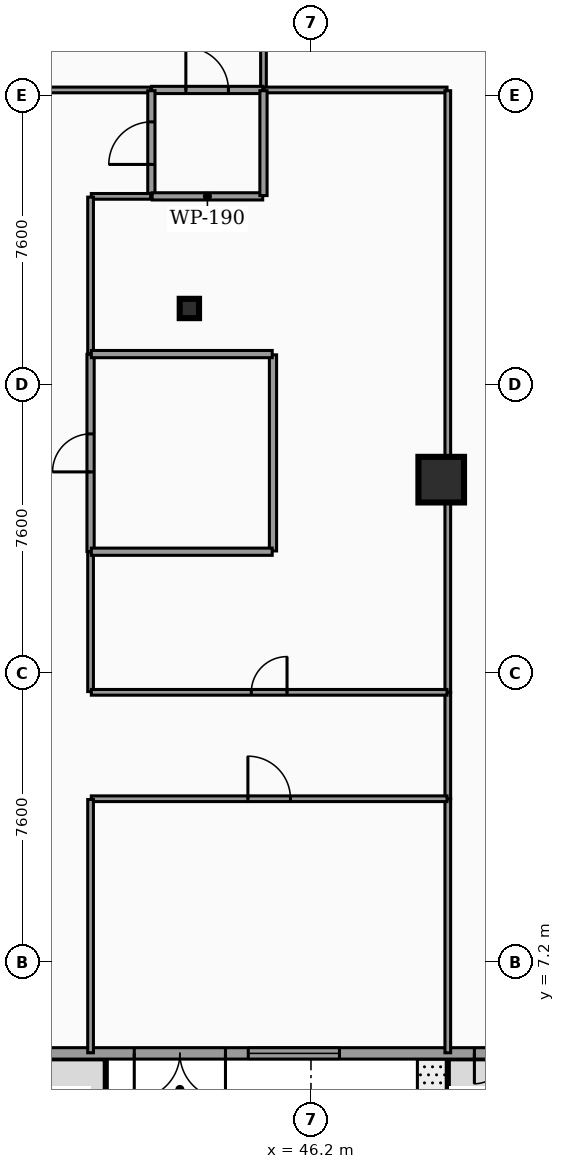
"""IFC4 building model, lengths in metres.
Left out: names, types, materials, properties, quantities, classifications, styles, units other than length and angle.
Written with IfcOpenShell. Run it as: python <this file> out.ifc"""

import sys

from ifc_helpers import new_model, si_unit, direction, frame, frame_2d, origin, origin_2d, place, context, subcontext, project, spatial, rectangle, hollow_rectangle, hollow_circle, extrude, element, fill, save


model = new_model("IFC4")
c1 = context("Model", 3, precision=1e-05, world=origin(), true_north=direction((0.0, 1.0)))
c2 = subcontext(c1, "Body", "Model", "MODEL_VIEW")
j1 = project(units=[si_unit("LENGTHUNIT", "METRE"), si_unit("PLANEANGLEUNIT", "RADIAN")], contexts=[c1])
p1 = place(None, origin())
s1 = spatial("IfcSite", under=j1, at=p1, CompositionType="ELEMENT")
p2 = place(p1, origin())
s2 = spatial("IfcBuilding", under=s1, at=p2, CompositionType="ELEMENT")
p3 = place(p2, origin())
s3 = spatial("IfcBuildingStorey", under=s2, at=p3, CompositionType="ELEMENT", Elevation=0.0)
p4 = place(p3, frame((49.627, 19.896, 0.0), z_axis=(0.0, 0.0, 1.0), x_axis=(1.0, 0.0, 0.0)))
e1 = element("IfcColumn", 1, at=p4, inside=s3, PredefinedType="COLUMN", context=c2, shape_type="SweptSolid", body=[
    extrude(hollow_rectangle(XDim=1.2, YDim=1.2, WallThickness=0.06, at=origin_2d()), origin(), (0.0, 0.0, 1.0), 4.82),
])
p5 = place(p3, frame((43.0, 24.4, 0.0), z_axis=(0.0, 0.0, 1.0), x_axis=(1.0, 0.0, 0.0)))
e2 = element("IfcColumn", 2, at=p5, inside=s3, PredefinedType="COLUMN", context=c2, shape_type="SweptSolid", body=[
    extrude(hollow_circle(Radius=0.254, WallThickness=0.02, at=origin_2d()), origin(), (0.0, 0.0, 1.0), 4.82),
])
p6 = place(p3, frame((75.1, 4.8, 0.0), z_axis=(0.0, 0.0, 1.0), x_axis=(-1.0, 0.0, 0.0)))
e3 = element("IfcWall", 3, at=p6, inside=s3, PredefinedType="STANDARD", context=c2, shape_type="SweptSolid", body=[
    extrude(rectangle(XDim=73.4, YDim=0.3, at=frame_2d((36.7, 0.0))), origin(), (0.0, 0.0, 1.0), 4.205),
])
p7 = place(p6, frame((65.3, 0.0, 0.0)))
e4 = element("IfcOpeningElement", 4, at=p7, cuts=e3, PredefinedType="OPENING", context=c2, shape_type="SweptSolid", body=[
    extrude(rectangle(XDim=4.4, YDim=3.5, at=frame_2d((2.2, 1.75))), frame((0.0, 0.16, 0.0), z_axis=(0.0, -1.0, 0.0), x_axis=(1.0, 0.0, 0.0)), (0.0, 0.0, 1.0), 0.32),
])
p8 = place(p6, frame((31.15, 0.0, 0.0)))
e5 = element("IfcOpeningElement", 5, at=p8, cuts=e3, PredefinedType="OPENING", context=c2, shape_type="SweptSolid", body=[
    extrude(rectangle(XDim=2.4, YDim=2.6, at=frame_2d((1.2, 1.3))), frame((0.0, 0.16, 0.0), z_axis=(0.0, -1.0, 0.0), x_axis=(1.0, 0.0, 0.0)), (0.0, 0.0, 1.0), 0.32),
])
p9 = place(p6, frame((50.6, 0.0, 0.0)))
e6 = element("IfcOpeningElement", 6, at=p9, cuts=e3, PredefinedType="OPENING", context=c2, shape_type="SweptSolid", body=[
    extrude(rectangle(XDim=1.6, YDim=2.4, at=frame_2d((0.8, 1.2))), frame((0.0, 0.16, 0.0), z_axis=(0.0, -1.0, 0.0), x_axis=(1.0, 0.0, 0.0)), (0.0, 0.0, 1.0), 0.32),
])
p10 = place(p6, frame((23.0, 0.0, 0.0)))
e7 = element("IfcOpeningElement", 7, at=p10, cuts=e3, PredefinedType="OPENING", context=c2, shape_type="SweptSolid", body=[
    extrude(rectangle(XDim=1.6, YDim=2.4, at=frame_2d((0.8, 1.2))), frame((0.0, 0.16, 0.0), z_axis=(0.0, -1.0, 0.0), x_axis=(1.0, 0.0, 0.0)), (0.0, 0.0, 1.0), 0.32),
])
p11 = place(p6, frame((7.6, 0.0, 0.0)))
e8 = element("IfcOpeningElement", 8, at=p11, cuts=e3, PredefinedType="OPENING", context=c2, shape_type="SweptSolid", body=[
    extrude(rectangle(XDim=1.8, YDim=2.4, at=frame_2d((0.9, 1.2))), frame((0.0, 0.16, 0.0), z_axis=(0.0, -1.0, 0.0), x_axis=(1.0, 0.0, 0.0)), (0.0, 0.0, 1.0), 0.32),
])
p12 = place(p6, frame((17.1, 0.0, 0.0)))
e9 = element("IfcOpeningElement", 9, at=p12, cuts=e3, PredefinedType="OPENING", context=c2, shape_type="SweptSolid", body=[
    extrude(rectangle(XDim=1.8, YDim=2.4, at=frame_2d((0.9, 1.2))), frame((0.0, 0.16, 0.0), z_axis=(0.0, -1.0, 0.0), x_axis=(1.0, 0.0, 0.0)), (0.0, 0.0, 1.0), 0.32),
])
p13 = place(p6, frame((59.75, 0.0, 0.0)))
e10 = element("IfcOpeningElement", 10, at=p13, cuts=e3, PredefinedType="OPENING", context=c2, shape_type="SweptSolid", body=[
    extrude(rectangle(XDim=1.8, YDim=2.4, at=frame_2d((0.9, 1.2))), frame((0.0, 0.16, 0.0), z_axis=(0.0, -1.0, 0.0), x_axis=(1.0, 0.0, 0.0)), (0.0, 0.0, 1.0), 0.32),
])
p14 = place(p6, frame((13.6, 0.0, 0.9)))
e11 = element("IfcOpeningElement", 11, at=p14, cuts=e3, PredefinedType="OPENING", context=c2, shape_type="SweptSolid", body=[
    extrude(rectangle(XDim=2.4, YDim=2.5, at=frame_2d((1.2, 1.25))), frame((0.0, 0.16, 0.0), z_axis=(0.0, -1.0, 0.0), x_axis=(1.0, 0.0, 0.0)), (0.0, 0.0, 1.0), 0.32),
])
p15 = place(p6, frame((28.15, 0.0, 0.9)))
e12 = element("IfcOpeningElement", 12, at=p15, cuts=e3, PredefinedType="OPENING", context=c2, shape_type="SweptSolid", body=[
    extrude(rectangle(XDim=2.4, YDim=2.5, at=frame_2d((1.2, 1.25))), frame((0.0, 0.16, 0.0), z_axis=(0.0, -1.0, 0.0), x_axis=(1.0, 0.0, 0.0)), (0.0, 0.0, 1.0), 0.32),
])
p16 = place(p6, frame((44.1, 0.0, 0.9)))
e13 = element("IfcOpeningElement", 13, at=p16, cuts=e3, PredefinedType="OPENING", context=c2, shape_type="SweptSolid", body=[
    extrude(rectangle(XDim=2.4, YDim=2.5, at=frame_2d((1.2, 1.25))), frame((0.0, 0.16, 0.0), z_axis=(0.0, -1.0, 0.0), x_axis=(1.0, 0.0, 0.0)), (0.0, 0.0, 1.0), 0.32),
])
p17 = place(p3, frame((44.95, 30.17, 0.0), z_axis=(0.0, 0.0, 1.0), x_axis=(0.0, 1.0, 0.0)))
e14 = element("IfcWall", 14, at=p17, inside=s3, PredefinedType="PARTITIONING", context=c2, shape_type="SweptSolid", body=[
    extrude(rectangle(XDim=3.06, YDim=0.15, at=frame_2d((1.53, 0.0))), origin(), (0.0, 0.0, 1.0), 3.777),
])
p18 = place(p3, frame((42.005, 30.15, 0.0), z_axis=(0.0, 0.0, 1.0), x_axis=(1.0, 0.0, 0.0)))
e15 = element("IfcWall", 15, at=p18, inside=s3, PredefinedType="PARTITIONING", context=c2, shape_type="SweptSolid", body=[
    extrude(rectangle(XDim=2.925, YDim=0.19, at=frame_2d((1.462, 0.0))), origin(), (0.0, 0.0, 1.0), 3.777),
])
p19 = place(p18, frame((0.903, 0.0, 0.0)))
e16 = element("IfcOpeningElement", 16, at=p19, cuts=e15, PredefinedType="OPENING", context=c2, shape_type="SweptSolid", body=[
    extrude(rectangle(XDim=1.12, YDim=2.05, at=frame_2d((0.56, 1.025))), frame((0.0, 0.105, 0.0), z_axis=(0.0, -1.0, 0.0), x_axis=(1.0, 0.0, 0.0)), (0.0, 0.0, 1.0), 0.21),
])
p20 = place(p3, frame((41.995, 30.15, 0.0), z_axis=(0.0, 0.0, 1.0), x_axis=(-1.0, 0.0, 0.0)))
e17 = element("IfcWall", 17, at=p20, inside=s3, PredefinedType="PARTITIONING", context=c2, shape_type="SweptSolid", body=[
    extrude(rectangle(XDim=13.425, YDim=0.15, at=frame_2d((6.712, 0.0))), origin(), (0.0, 0.0, 1.0), 3.777),
])
p21 = place(p20, frame((6.242, 0.0, 0.0)))
e18 = element("IfcOpeningElement", 18, at=p21, cuts=e17, PredefinedType="OPENING", context=c2, shape_type="SweptSolid", body=[
    extrude(rectangle(XDim=0.94, YDim=2.05, at=frame_2d((0.47, 1.025))), frame((0.0, 0.085, 0.0), z_axis=(0.0, -1.0, 0.0), x_axis=(1.0, 0.0, 0.0)), (0.0, 0.0, 1.0), 0.17),
])
p22 = place(p3, frame((49.8, 11.505, 0.0), z_axis=(0.0, 0.0, 1.0), x_axis=(0.0, 1.0, 0.0)))
e19 = element("IfcWall", 19, at=p22, inside=s3, PredefinedType="PARTITIONING", context=c2, shape_type="SweptSolid", body=[
    extrude(rectangle(XDim=2.79, YDim=0.15, at=frame_2d((1.395, 0.0))), origin(), (0.0, 0.0, 1.0), 3.777),
])
p23 = place(p3, frame((44.97, 30.15, 0.0), z_axis=(0.0, 0.0, 1.0), x_axis=(1.0, 0.0, 0.0)))
e20 = element("IfcWall", 20, at=p23, inside=s3, PredefinedType="PARTITIONING", context=c2, shape_type="SweptSolid", body=[
    extrude(rectangle(XDim=4.81, YDim=0.15, at=frame_2d((2.405, 0.0))), origin(), (0.0, 0.0, 1.0), 3.777),
])
p24 = place(p3, frame((49.8, 14.305, 0.0), z_axis=(0.0, 0.0, 1.0), x_axis=(0.0, 1.0, 0.0)))
e21 = element("IfcWall", 21, at=p24, inside=s3, PredefinedType="PARTITIONING", context=c2, shape_type="SweptSolid", body=[
    extrude(rectangle(XDim=15.825, YDim=0.15, at=frame_2d((7.913, 0.0))), origin(), (0.0, 0.0, 1.0), 3.777),
])
p25 = place(p3, frame((49.8, 4.815, 0.0), z_axis=(0.0, 0.0, 1.0), x_axis=(0.0, 1.0, 0.0)))
e22 = element("IfcWall", 22, at=p25, inside=s3, PredefinedType="PARTITIONING", context=c2, shape_type="SweptSolid", body=[
    extrude(rectangle(XDim=6.68, YDim=0.15, at=frame_2d((3.34, 0.0))), origin(), (0.0, 0.0, 1.0), 3.777),
])
p26 = place(p3, frame((42.0, 27.37, 0.0), z_axis=(0.0, 0.0, 1.0), x_axis=(0.0, 1.0, 0.0)))
e23 = element("IfcWall", 23, at=p26, inside=s3, PredefinedType="PARTITIONING", context=c2, shape_type="SweptSolid", body=[
    extrude(rectangle(XDim=2.76, YDim=0.19, at=frame_2d((1.38, 0.0))), origin(), (0.0, 0.0, 1.0), 3.777),
])
p27 = place(p26, frame((0.82, 0.0, 0.0)))
e24 = element("IfcOpeningElement", 24, at=p27, cuts=e23, PredefinedType="OPENING", context=c2, shape_type="SweptSolid", body=[
    extrude(rectangle(XDim=1.12, YDim=2.05, at=frame_2d((0.56, 1.025))), frame((0.0, 0.105, 0.0), z_axis=(0.0, -1.0, 0.0), x_axis=(1.0, 0.0, 0.0)), (0.0, 0.0, 1.0), 0.21),
])
p28 = place(p3, frame((42.02, 27.35, 0.0), z_axis=(0.0, 0.0, 1.0), x_axis=(1.0, 0.0, 0.0)))
e25 = element("IfcWall", 25, at=p28, inside=s3, PredefinedType="PARTITIONING", context=c2, shape_type="SweptSolid", body=[
    extrude(rectangle(XDim=2.91, YDim=0.19, at=frame_2d((1.455, 0.0))), origin(), (0.0, 0.0, 1.0), 3.777),
])
p29 = place(p3, frame((44.95, 27.37, 0.0), z_axis=(0.0, 0.0, 1.0), x_axis=(0.0, 1.0, 0.0)))
e26 = element("IfcWall", 26, at=p29, inside=s3, PredefinedType="PARTITIONING", context=c2, shape_type="SweptSolid", body=[
    extrude(rectangle(XDim=2.76, YDim=0.19, at=frame_2d((1.38, 0.0))), origin(), (0.0, 0.0, 1.0), 3.777),
])
p30 = place(p3, frame((40.4, 18.005, 0.0), z_axis=(0.0, 0.0, 1.0), x_axis=(0.0, 1.0, 0.0)))
e27 = element("IfcWall", 27, at=p30, inside=s3, PredefinedType="PARTITIONING", context=c2, shape_type="SweptSolid", body=[
    extrude(rectangle(XDim=5.19, YDim=0.19, at=frame_2d((2.595, 0.0))), origin(), (0.0, 0.0, 1.0), 3.777),
])
p31 = place(p30, frame((2.095, 0.0, 0.0)))
e28 = element("IfcOpeningElement", 28, at=p31, cuts=e27, PredefinedType="OPENING", context=c2, shape_type="SweptSolid", body=[
    extrude(rectangle(XDim=1.0, YDim=2.05, at=frame_2d((0.5, 1.025))), frame((0.0, 0.105, 0.0), z_axis=(0.0, -1.0, 0.0), x_axis=(1.0, 0.0, 0.0)), (0.0, 0.0, 1.0), 0.21),
])
p32 = place(p3, frame((40.42, 27.35, 0.0), z_axis=(0.0, 0.0, 1.0), x_axis=(1.0, 0.0, 0.0)))
e29 = element("IfcWall", 29, at=p32, inside=s3, PredefinedType="PARTITIONING", context=c2, shape_type="SweptSolid", body=[
    extrude(rectangle(XDim=1.56, YDim=0.15, at=frame_2d((0.78, 0.0))), origin(), (0.0, 0.0, 1.0), 3.777),
])
p33 = place(p3, frame((40.4, 23.205, 0.0), z_axis=(0.0, 0.0, 1.0), x_axis=(0.0, 1.0, 0.0)))
e30 = element("IfcWall", 30, at=p33, inside=s3, PredefinedType="PARTITIONING", context=c2, shape_type="SweptSolid", body=[
    extrude(rectangle(XDim=4.125, YDim=0.15, at=frame_2d((2.062, 0.0))), origin(), (0.0, 0.0, 1.0), 3.777),
])
p34 = place(p3, frame((40.4, 14.32, 0.0), z_axis=(0.0, 0.0, 1.0), x_axis=(0.0, 1.0, 0.0)))
e31 = element("IfcWall", 31, at=p34, inside=s3, PredefinedType="PARTITIONING", context=c2, shape_type="SweptSolid", body=[
    extrude(rectangle(XDim=3.675, YDim=0.15, at=frame_2d((1.837, 0.0))), origin(), (0.0, 0.0, 1.0), 3.777),
])
p35 = place(p3, frame((40.42, 14.3, 0.0), z_axis=(0.0, 0.0, 1.0), x_axis=(1.0, 0.0, 0.0)))
e32 = element("IfcWall", 32, at=p35, inside=s3, PredefinedType="PARTITIONING", context=c2, shape_type="SweptSolid", body=[
    extrude(rectangle(XDim=9.36, YDim=0.15, at=frame_2d((4.68, 0.0))), origin(), (0.0, 0.0, 1.0), 3.777),
])
p36 = place(p35, frame((4.21, 0.0, 0.0)))
e33 = element("IfcOpeningElement", 33, at=p36, cuts=e32, PredefinedType="OPENING", context=c2, shape_type="SweptSolid", body=[
    extrude(rectangle(XDim=0.94, YDim=2.05, at=frame_2d((0.47, 1.025))), frame((0.0, 0.085, 0.0), z_axis=(0.0, -1.0, 0.0), x_axis=(1.0, 0.0, 0.0)), (0.0, 0.0, 1.0), 0.17),
])
p37 = place(p3, frame((40.42, 11.5, 0.0), z_axis=(0.0, 0.0, 1.0), x_axis=(1.0, 0.0, 0.0)))
e34 = element("IfcWall", 34, at=p37, inside=s3, PredefinedType="PARTITIONING", context=c2, shape_type="SweptSolid", body=[
    extrude(rectangle(XDim=9.36, YDim=0.15, at=frame_2d((4.68, 0.0))), origin(), (0.0, 0.0, 1.0), 3.777),
])
p38 = place(p37, frame((4.12, 0.0, 0.0)))
e35 = element("IfcOpeningElement", 35, at=p38, cuts=e34, PredefinedType="OPENING", context=c2, shape_type="SweptSolid", body=[
    extrude(rectangle(XDim=1.12, YDim=2.05, at=frame_2d((0.56, 1.025))), frame((0.0, 0.085, 0.0), z_axis=(0.0, -1.0, 0.0), x_axis=(1.0, 0.0, 0.0)), (0.0, 0.0, 1.0), 0.17),
])
p39 = place(p3, frame((40.4, 4.815, 0.0), z_axis=(0.0, 0.0, 1.0), x_axis=(0.0, 1.0, 0.0)))
e36 = element("IfcWall", 36, at=p39, inside=s3, PredefinedType="PARTITIONING", context=c2, shape_type="SweptSolid", body=[
    extrude(rectangle(XDim=6.665, YDim=0.15, at=frame_2d((3.333, 0.0))), origin(), (0.0, 0.0, 1.0), 3.777),
])
p40 = place(p3, frame((45.2, 18.02, 0.0), z_axis=(0.0, 0.0, 1.0), x_axis=(0.0, 1.0, 0.0)))
e37 = element("IfcWall", 37, at=p40, inside=s3, PredefinedType="PARTITIONING", context=c2, shape_type="SweptSolid", body=[
    extrude(rectangle(XDim=5.16, YDim=0.19, at=frame_2d((2.58, 0.0))), origin(), (0.0, 0.0, 1.0), 3.777),
])
for number, where, z_axis, x_axis in (
    (38, (40.42, 18.0, 0.0), (0.0, 0.0, 1.0), (1.0, 0.0, 0.0)),
    (39, (40.42, 23.2, 0.0), (0.0, 0.0, 1.0), (1.0, 0.0, 0.0)),
):
    element("IfcWall", number, at=place(p3, frame(where, z_axis=z_axis, x_axis=x_axis)), inside=s3, PredefinedType="PARTITIONING", context=c2, shape_type="SweptSolid", body=[
        extrude(rectangle(XDim=4.76, YDim=0.19, at=frame_2d((2.38, 0.0))), origin(), (0.0, 0.0, 1.0), 3.777),
    ])
p41 = place(p8, origin())
e40 = element("IfcDoor", 40, at=p41, inside=s3, OperationType="DOUBLE_DOOR_SINGLE_SWING", PredefinedType="DOOR", context=c2, shape_type="SweptSolid", body=[
    extrude(rectangle(XDim=2.4, YDim=2.6, at=frame_2d((1.2, 1.3))), frame((0.0, 0.025, 0.0), z_axis=(0.0, -1.0, 0.0), x_axis=(1.0, 0.0, 0.0)), (0.0, 0.0, 1.0), 0.05),
])
fill(e5, e40)
p42 = place(p10, origin())
e41 = element("IfcDoor", 41, at=p42, inside=s3, OperationType="DOUBLE_DOOR_SINGLE_SWING", PredefinedType="DOOR", context=c2, shape_type="SweptSolid", body=[
    extrude(rectangle(XDim=1.6, YDim=2.4, at=frame_2d((0.8, 1.2))), frame((0.0, 0.025, 0.0), z_axis=(0.0, -1.0, 0.0), x_axis=(1.0, 0.0, 0.0)), (0.0, 0.0, 1.0), 0.05),
])
fill(e7, e41)
p43 = place(p15, origin())
e42 = element("IfcWindow", 42, at=p43, inside=s3, PartitioningType="SINGLE_PANEL", PredefinedType="WINDOW", context=c2, shape_type="SweptSolid", body=[
    extrude(rectangle(XDim=2.4, YDim=2.5, at=frame_2d((1.2, 1.25))), frame((0.0, 0.03, 0.0), z_axis=(0.0, -1.0, 0.0), x_axis=(1.0, 0.0, 0.0)), (0.0, 0.0, 1.0), 0.06),
])
fill(e12, e42)
p44 = place(p19, origin())
e43 = element("IfcDoor", 43, at=p44, inside=s3, OperationType="SINGLE_SWING_LEFT", PredefinedType="DOOR", context=c2, shape_type="SweptSolid", body=[
    extrude(rectangle(XDim=1.12, YDim=2.05, at=frame_2d((0.56, 1.025))), frame((0.0, 0.025, 0.0), z_axis=(0.0, -1.0, 0.0), x_axis=(1.0, 0.0, 0.0)), (0.0, 0.0, 1.0), 0.05),
])
fill(e16, e43)
p45 = place(p27, origin())
e44 = element("IfcDoor", 44, at=p45, inside=s3, OperationType="SINGLE_SWING_LEFT", PredefinedType="DOOR", context=c2, shape_type="SweptSolid", body=[
    extrude(rectangle(XDim=1.12, YDim=2.05, at=frame_2d((0.56, 1.025))), frame((0.0, 0.025, 0.0), z_axis=(0.0, -1.0, 0.0), x_axis=(1.0, 0.0, 0.0)), (0.0, 0.0, 1.0), 0.05),
])
fill(e24, e44)
p46 = place(p31, origin())
e45 = element("IfcDoor", 45, at=p46, inside=s3, OperationType="SINGLE_SWING_LEFT", PredefinedType="DOOR", context=c2, shape_type="SweptSolid", body=[
    extrude(rectangle(XDim=1.0, YDim=2.05, at=frame_2d((0.5, 1.025))), frame((0.0, 0.025, 0.0), z_axis=(0.0, -1.0, 0.0), x_axis=(1.0, 0.0, 0.0)), (0.0, 0.0, 1.0), 0.05),
])
fill(e28, e45)
p47 = place(p36, origin())
e46 = element("IfcDoor", 46, at=p47, inside=s3, OperationType="SINGLE_SWING_RIGHT", PredefinedType="DOOR", context=c2, shape_type="SweptSolid", body=[
    extrude(rectangle(XDim=0.94, YDim=2.05, at=frame_2d((0.47, 1.025))), frame((0.0, 0.025, 0.0), z_axis=(0.0, -1.0, 0.0), x_axis=(1.0, 0.0, 0.0)), (0.0, 0.0, 1.0), 0.05),
])
fill(e33, e46)
p48 = place(p38, origin())
e47 = element("IfcDoor", 47, at=p48, inside=s3, OperationType="SINGLE_SWING_LEFT", PredefinedType="DOOR", context=c2, shape_type="SweptSolid", body=[
    extrude(rectangle(XDim=1.12, YDim=2.05, at=frame_2d((0.56, 1.025))), frame((0.0, 0.025, 0.0), z_axis=(0.0, -1.0, 0.0), x_axis=(1.0, 0.0, 0.0)), (0.0, 0.0, 1.0), 0.05),
])
fill(e35, e47)
save(model, sys.argv[1])
